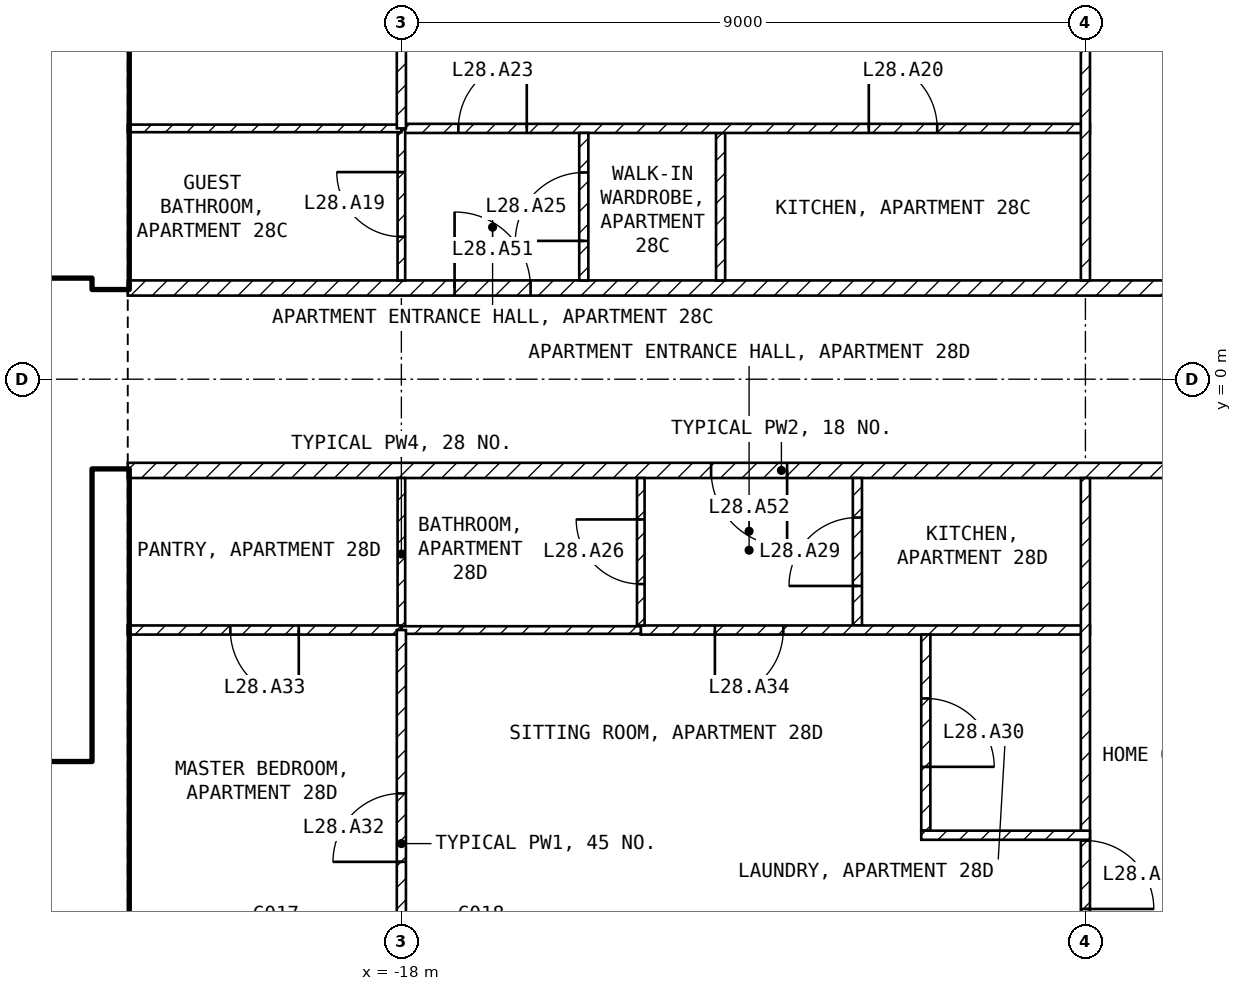
"""IFC4 building model, lengths in metres.
Left out: names, types, materials, properties, quantities, classifications, styles, units other than length and angle.
Written with IfcOpenShell. Run it as: python <this file> out.ifc"""

import sys

from ifc_helpers import new_model, si_unit, direction, frame, frame_2d, origin, place, context, subcontext, project, spatial, rectangle, extrude, element, fill, save


model = new_model("IFC4")
c1 = context("Model", 3, precision=1e-05, world=origin(), true_north=direction((0.0, 1.0)))
c2 = subcontext(c1, "Body", "Model", "MODEL_VIEW")
j1 = project(units=[si_unit("LENGTHUNIT", "METRE"), si_unit("PLANEANGLEUNIT", "RADIAN")], contexts=[c1])
p1 = place(None, origin())
s1 = spatial("IfcSite", under=j1, at=p1, CompositionType="ELEMENT")
p2 = place(p1, origin())
s2 = spatial("IfcBuilding", under=s1, at=p2, CompositionType="ELEMENT")
p3 = place(p2, frame((0.0, 0.0, 119.9)))
s3 = spatial("IfcBuildingStorey", under=s2, at=p3, CompositionType="ELEMENT", Elevation=119.9)
for number, where, z_axis, x_axis in (
    (1, (-21.825, -8.1, 0.0), (0.0, 0.0, 1.0), (0.0, 1.0, 0.0)),
    (2, (-21.825, 1.2, 0.0), (0.0, 0.0, 1.0), (0.0, 1.0, 0.0)),
):
    element("IfcWall", number, at=place(p3, frame(where, z_axis=z_axis, x_axis=x_axis)), inside=s3, PredefinedType="SHEAR", context=c2, shape_type="SweptSolid", body=[
        extrude(rectangle(XDim=6.9, YDim=0.45, at=frame_2d((3.45, 0.0))), origin(), (0.0, 0.0, 1.0), 3.25),
    ])
p4 = place(p3, frame((-33.05, 1.45, 0.0), z_axis=(0.0, 0.0, 1.0), x_axis=(1.0, 0.0, 0.0)))
e3 = element("IfcWall", 3, at=p4, inside=s3, PredefinedType="SOLIDWALL", context=c2, shape_type="SweptSolid", body=[
    extrude(rectangle(XDim=11.0, YDim=0.2, at=frame_2d((5.5, 0.0))), origin(), (0.0, 0.0, 1.0), 3.25),
])
p5 = place(p4, frame((9.25, 0.0, 0.0)))
e4 = element("IfcOpeningElement", 4, at=p5, cuts=e3, PredefinedType="OPENING", context=c2, shape_type="SweptSolid", body=[
    extrude(rectangle(XDim=1.0, YDim=2.1, at=frame_2d((0.5, 1.05))), frame((0.0, 0.11, 0.0), z_axis=(0.0, -1.0, 0.0), x_axis=(1.0, 0.0, 0.0)), (0.0, 0.0, 1.0), 0.22),
])
p6 = place(p4, frame((6.75, 0.0, 0.0)))
e5 = element("IfcOpeningElement", 5, at=p6, cuts=e3, PredefinedType="OPENING", context=c2, shape_type="SweptSolid", body=[
    extrude(rectangle(XDim=1.0, YDim=2.1, at=frame_2d((0.5, 1.05))), frame((0.0, 0.11, 0.0), z_axis=(0.0, -1.0, 0.0), x_axis=(1.0, 0.0, 0.0)), (0.0, 0.0, 1.0), 0.22),
])
p7 = place(p4, frame((1.025, 0.0, 0.0)))
e6 = element("IfcOpeningElement", 6, at=p7, cuts=e3, PredefinedType="OPENING", context=c2, shape_type="SweptSolid", body=[
    extrude(rectangle(XDim=0.9, YDim=2.1, at=frame_2d((0.45, 1.05))), frame((0.0, 0.11, 0.0), z_axis=(0.0, -1.0, 0.0), x_axis=(1.0, 0.0, 0.0)), (0.0, 0.0, 1.0), 0.22),
])
p8 = place(p3, frame((-28.35, -5.15, 0.0), z_axis=(0.0, 0.0, 1.0), x_axis=(1.0, 0.0, 0.0)))
e7 = element("IfcWall", 7, at=p8, inside=s3, PredefinedType="SOLIDWALL", context=c2, shape_type="SweptSolid", body=[
    extrude(rectangle(XDim=6.3, YDim=0.2, at=frame_2d((3.15, 0.0))), origin(), (0.0, 0.0, 1.0), 3.25),
])
p9 = place(p8, frame((5.1, 0.0, 0.0)))
e8 = element("IfcOpeningElement", 8, at=p9, cuts=e7, PredefinedType="OPENING", context=c2, shape_type="SweptSolid", body=[
    extrude(rectangle(XDim=1.0, YDim=2.1, at=frame_2d((0.5, 1.05))), frame((0.0, 0.11, 0.0), z_axis=(0.0, -1.0, 0.0), x_axis=(1.0, 0.0, 0.0)), (0.0, 0.0, 1.0), 0.22),
])
p10 = place(p3, frame((-21.6, 1.2, 0.0), z_axis=(0.0, 0.0, 1.0), x_axis=(1.0, 0.0, 0.0)))
e9 = element("IfcWall", 9, at=p10, inside=s3, PredefinedType="PARTITIONING", context=c2, shape_type="SweptSolid", body=[
    extrude(rectangle(XDim=17.2, YDim=0.2, at=frame_2d((8.6, 0.0))), origin(), (0.0, 0.0, 1.0), 3.25),
])
p11 = place(p10, frame((4.3, 0.0, 0.0)))
e10 = element("IfcOpeningElement", 10, at=p11, cuts=e9, PredefinedType="OPENING", context=c2, shape_type="SweptSolid", body=[
    extrude(rectangle(XDim=1.0, YDim=2.1, at=frame_2d((0.5, 1.05))), frame((0.0, 0.11, 0.0), z_axis=(0.0, -1.0, 0.0), x_axis=(1.0, 0.0, 0.0)), (0.0, 0.0, 1.0), 0.22),
])
p12 = place(p3, frame((-4.4, -1.2, 0.0), z_axis=(0.0, 0.0, 1.0), x_axis=(-1.0, 0.0, 0.0)))
e11 = element("IfcWall", 11, at=p12, inside=s3, PredefinedType="PARTITIONING", context=c2, shape_type="SweptSolid", body=[
    extrude(rectangle(XDim=17.2, YDim=0.2, at=frame_2d((8.6, 0.0))), origin(), (0.0, 0.0, 1.0), 3.25),
])
p13 = place(p12, frame((8.525, 0.0, 0.0)))
e12 = element("IfcOpeningElement", 12, at=p13, cuts=e11, PredefinedType="OPENING", context=c2, shape_type="SweptSolid", body=[
    extrude(rectangle(XDim=1.0, YDim=2.1, at=frame_2d((0.5, 1.05))), frame((0.0, 0.11, 0.0), z_axis=(0.0, -1.0, 0.0), x_axis=(1.0, 0.0, 0.0)), (0.0, 0.0, 1.0), 0.22),
])
p14 = place(p3, frame((-13.8, 1.3, 0.0), z_axis=(0.0, 0.0, 1.0), x_axis=(0.0, 1.0, 0.0)))
e13 = element("IfcWall", 13, at=p14, inside=s3, PredefinedType="PARTITIONING", context=c2, shape_type="SweptSolid", body=[
    extrude(rectangle(XDim=1.94, YDim=0.12, at=frame_2d((0.97, 0.0))), origin(), (0.0, 0.0, 1.0), 3.25),
])
p15 = place(p3, frame((-18.0, 3.3, 0.0), z_axis=(0.0, 0.0, 1.0), x_axis=(1.0, 0.0, 0.0)))
e14 = element("IfcWall", 14, at=p15, inside=s3, PredefinedType="PARTITIONING", context=c2, shape_type="SweptSolid", body=[
    extrude(rectangle(XDim=9.06, YDim=0.12, at=frame_2d((4.53, 0.0))), origin(), (0.0, 0.0, 1.0), 3.25),
])
p16 = place(p15, frame((6.15, 0.0, 0.0)))
e15 = element("IfcOpeningElement", 15, at=p16, cuts=e14, PredefinedType="OPENING", context=c2, shape_type="SweptSolid", body=[
    extrude(rectangle(XDim=0.9, YDim=2.1, at=frame_2d((0.45, 1.05))), frame((0.0, 0.07, 0.0), z_axis=(0.0, -1.0, 0.0), x_axis=(1.0, 0.0, 0.0)), (0.0, 0.0, 1.0), 0.14),
])
p17 = place(p15, frame((0.75, 0.0, 0.0)))
e16 = element("IfcOpeningElement", 16, at=p17, cuts=e14, PredefinedType="OPENING", context=c2, shape_type="SweptSolid", body=[
    extrude(rectangle(XDim=0.9, YDim=2.1, at=frame_2d((0.45, 1.05))), frame((0.0, 0.07, 0.0), z_axis=(0.0, -1.0, 0.0), x_axis=(1.0, 0.0, 0.0)), (0.0, 0.0, 1.0), 0.14),
])
p18 = place(p3, frame((-9.0, 8.92, 0.0), z_axis=(0.0, 0.0, 1.0), x_axis=(0.0, -1.0, 0.0)))
e17 = element("IfcWall", 17, at=p18, inside=s3, PredefinedType="PARTITIONING", context=c2, shape_type="SweptSolid", body=[
    extrude(rectangle(XDim=7.62, YDim=0.12, at=frame_2d((3.81, 0.0))), origin(), (0.0, 0.0, 1.0), 3.25),
])
p19 = place(p18, frame((2.52, 0.0, 0.0)))
e18 = element("IfcOpeningElement", 18, at=p19, cuts=e17, PredefinedType="OPENING", context=c2, shape_type="SweptSolid", body=[
    extrude(rectangle(XDim=0.9, YDim=2.1, at=frame_2d((0.45, 1.05))), frame((0.0, 0.07, 0.0), z_axis=(0.0, -1.0, 0.0), x_axis=(1.0, 0.0, 0.0)), (0.0, 0.0, 1.0), 0.14),
])
p20 = place(p3, frame((-15.6, 1.3, 0.0), z_axis=(0.0, 0.0, 1.0), x_axis=(0.0, 1.0, 0.0)))
e19 = element("IfcWall", 19, at=p20, inside=s3, PredefinedType="PARTITIONING", context=c2, shape_type="SweptSolid", body=[
    extrude(rectangle(XDim=1.94, YDim=0.12, at=frame_2d((0.97, 0.0))), origin(), (0.0, 0.0, 1.0), 3.25),
])
p21 = place(p20, frame((0.52, 0.0, 0.0)))
e20 = element("IfcOpeningElement", 20, at=p21, cuts=e19, PredefinedType="OPENING", context=c2, shape_type="SweptSolid", body=[
    extrude(rectangle(XDim=0.9, YDim=2.1, at=frame_2d((0.45, 1.05))), frame((0.0, 0.07, 0.0), z_axis=(0.0, -1.0, 0.0), x_axis=(1.0, 0.0, 0.0)), (0.0, 0.0, 1.0), 0.14),
])
p22 = place(p3, frame((-18.0, 1.3, 0.0), z_axis=(0.0, 0.0, 1.0), x_axis=(0.0, 1.0, 0.0)))
e21 = element("IfcWall", 21, at=p22, inside=s3, PredefinedType="PARTITIONING", context=c2, shape_type="SweptSolid", body=[
    extrude(rectangle(XDim=2.0, YDim=0.1, at=frame_2d((1.0, 0.0))), origin(), (0.0, 0.0, 1.0), 2.414),
])
p23 = place(p22, frame((0.575, 0.0, 0.0)))
e22 = element("IfcOpeningElement", 22, at=p23, cuts=e21, PredefinedType="OPENING", context=c2, shape_type="SweptSolid", body=[
    extrude(rectangle(XDim=0.85, YDim=2.1, at=frame_2d((0.425, 1.05))), frame((0.0, 0.06, 0.0), z_axis=(0.0, -1.0, 0.0), x_axis=(1.0, 0.0, 0.0)), (0.0, 0.0, 1.0), 0.12),
])
p24 = place(p3, frame((-21.6, 3.3, 0.0), z_axis=(0.0, 0.0, 1.0), x_axis=(1.0, 0.0, 0.0)))
e23 = element("IfcWall", 23, at=p24, inside=s3, PredefinedType="PARTITIONING", context=c2, shape_type="SweptSolid", body=[
    extrude(rectangle(XDim=3.6, YDim=0.1, at=frame_2d((1.8, 0.0))), origin(), (0.0, 0.0, 1.0), 3.25),
])
p25 = place(p3, frame((-18.0, 3.3, 0.0), z_axis=(0.0, 0.0, 1.0), x_axis=(0.0, 1.0, 0.0)))
e24 = element("IfcWall", 24, at=p25, inside=s3, PredefinedType="PARTITIONING", context=c2, shape_type="SweptSolid", body=[
    extrude(rectangle(XDim=5.62, YDim=0.12, at=frame_2d((2.81, 0.0))), origin(), (0.0, 0.0, 1.0), 2.414),
])
p26 = place(p25, frame((2.15, 0.0, 0.0)))
e25 = element("IfcOpeningElement", 25, at=p26, cuts=e24, PredefinedType="OPENING", context=c2, shape_type="SweptSolid", body=[
    extrude(rectangle(XDim=0.9, YDim=2.1, at=frame_2d((0.45, 1.05))), frame((0.0, 0.07, 0.0), z_axis=(0.0, -1.0, 0.0), x_axis=(1.0, 0.0, 0.0)), (0.0, 0.0, 1.0), 0.14),
])
p27 = place(p3, frame((-12.0, -3.24, 0.0), z_axis=(0.0, 0.0, 1.0), x_axis=(0.0, 1.0, 0.0)))
e26 = element("IfcWall", 26, at=p27, inside=s3, PredefinedType="PARTITIONING", context=c2, shape_type="SweptSolid", body=[
    extrude(rectangle(XDim=1.94, YDim=0.12, at=frame_2d((0.97, 0.0))), origin(), (0.0, 0.0, 1.0), 3.25),
])
p28 = place(p27, frame((0.52, 0.0, 0.0)))
e27 = element("IfcOpeningElement", 27, at=p28, cuts=e26, PredefinedType="OPENING", context=c2, shape_type="SweptSolid", body=[
    extrude(rectangle(XDim=0.9, YDim=2.1, at=frame_2d((0.45, 1.05))), frame((0.0, 0.07, 0.0), z_axis=(0.0, -1.0, 0.0), x_axis=(1.0, 0.0, 0.0)), (0.0, 0.0, 1.0), 0.14),
])
p29 = place(p3, frame((-8.94, -3.3, 0.0), z_axis=(0.0, 0.0, 1.0), x_axis=(-1.0, 0.0, 0.0)))
e28 = element("IfcWall", 28, at=p29, inside=s3, PredefinedType="PARTITIONING", context=c2, shape_type="SweptSolid", body=[
    extrude(rectangle(XDim=5.91, YDim=0.12, at=frame_2d((2.955, 0.0))), origin(), (0.0, 0.0, 1.0), 3.25),
])
p30 = place(p29, frame((4.035, 0.0, 0.0)))
e29 = element("IfcOpeningElement", 29, at=p30, cuts=e28, PredefinedType="OPENING", context=c2, shape_type="SweptSolid", body=[
    extrude(rectangle(XDim=0.9, YDim=2.1, at=frame_2d((0.45, 1.05))), frame((0.0, 0.07, 0.0), z_axis=(0.0, -1.0, 0.0), x_axis=(1.0, 0.0, 0.0)), (0.0, 0.0, 1.0), 0.14),
])
p31 = place(p3, frame((-9.0, -1.3, 0.0), z_axis=(0.0, 0.0, 1.0), x_axis=(0.0, -1.0, 0.0)))
e30 = element("IfcWall", 30, at=p31, inside=s3, PredefinedType="PARTITIONING", context=c2, shape_type="SweptSolid", body=[
    extrude(rectangle(XDim=7.62, YDim=0.12, at=frame_2d((3.81, 0.0))), origin(), (0.0, 0.0, 1.0), 3.25),
])
p32 = place(p31, frame((4.77, 0.0, 0.0)))
e31 = element("IfcOpeningElement", 31, at=p32, cuts=e30, PredefinedType="OPENING", context=c2, shape_type="SweptSolid", body=[
    extrude(rectangle(XDim=0.9, YDim=2.1, at=frame_2d((0.45, 1.05))), frame((0.0, 0.07, 0.0), z_axis=(0.0, -1.0, 0.0), x_axis=(1.0, 0.0, 0.0)), (0.0, 0.0, 1.0), 0.14),
])
p33 = place(p3, frame((-14.85, -3.24, 0.0), z_axis=(0.0, 0.0, 1.0), x_axis=(0.0, 1.0, 0.0)))
e32 = element("IfcWall", 32, at=p33, inside=s3, PredefinedType="PARTITIONING", context=c2, shape_type="SweptSolid", body=[
    extrude(rectangle(XDim=1.94, YDim=0.1, at=frame_2d((0.97, 0.0))), origin(), (0.0, 0.0, 1.0), 3.25),
])
p34 = place(p33, frame((0.545, 0.0, 0.0)))
e33 = element("IfcOpeningElement", 33, at=p34, cuts=e32, PredefinedType="OPENING", context=c2, shape_type="SweptSolid", body=[
    extrude(rectangle(XDim=0.85, YDim=2.1, at=frame_2d((0.425, 1.05))), frame((0.0, 0.06, 0.0), z_axis=(0.0, -1.0, 0.0), x_axis=(1.0, 0.0, 0.0)), (0.0, 0.0, 1.0), 0.12),
])
p35 = place(p3, frame((-18.0, -3.3, 0.0), z_axis=(0.0, 0.0, 1.0), x_axis=(0.0, 1.0, 0.0)))
e34 = element("IfcWall", 34, at=p35, inside=s3, PredefinedType="PARTITIONING", context=c2, shape_type="SweptSolid", body=[
    extrude(rectangle(XDim=2.0, YDim=0.1, at=frame_2d((1.0, 0.0))), origin(), (0.0, 0.0, 1.0), 2.414),
])
p36 = place(p3, frame((-14.85, -3.3, 0.0), z_axis=(0.0, 0.0, 1.0), x_axis=(-1.0, 0.0, 0.0)))
e35 = element("IfcWall", 35, at=p36, inside=s3, PredefinedType="PARTITIONING", context=c2, shape_type="SweptSolid", body=[
    extrude(rectangle(XDim=3.15, YDim=0.1, at=frame_2d((1.575, 0.0))), origin(), (0.0, 0.0, 1.0), 3.25),
])
p37 = place(p3, frame((-18.0, -3.3, 0.0), z_axis=(0.0, 0.0, 1.0), x_axis=(-1.0, 0.0, 0.0)))
e36 = element("IfcWall", 36, at=p37, inside=s3, PredefinedType="PARTITIONING", context=c2, shape_type="SweptSolid", body=[
    extrude(rectangle(XDim=3.6, YDim=0.12, at=frame_2d((1.8, 0.0))), origin(), (0.0, 0.0, 1.0), 3.25),
])
p38 = place(p37, frame((1.35, 0.0, 0.0)))
e37 = element("IfcOpeningElement", 37, at=p38, cuts=e36, PredefinedType="OPENING", context=c2, shape_type="SweptSolid", body=[
    extrude(rectangle(XDim=0.9, YDim=2.1, at=frame_2d((0.45, 1.05))), frame((0.0, 0.07, 0.0), z_axis=(0.0, -1.0, 0.0), x_axis=(1.0, 0.0, 0.0)), (0.0, 0.0, 1.0), 0.14),
])
p39 = place(p3, frame((-11.1, -3.36, 0.0), z_axis=(0.0, 0.0, 1.0), x_axis=(0.0, -1.0, 0.0)))
e38 = element("IfcWall", 38, at=p39, inside=s3, PredefinedType="PARTITIONING", context=c2, shape_type="SweptSolid", body=[
    extrude(rectangle(XDim=2.58, YDim=0.12, at=frame_2d((1.29, 0.0))), origin(), (0.0, 0.0, 1.0), 3.25),
])
p40 = place(p39, frame((0.84, 0.0, 0.0)))
e39 = element("IfcOpeningElement", 39, at=p40, cuts=e38, PredefinedType="OPENING", context=c2, shape_type="SweptSolid", body=[
    extrude(rectangle(XDim=0.9, YDim=2.1, at=frame_2d((0.45, 1.05))), frame((0.0, 0.07, 0.0), z_axis=(0.0, -1.0, 0.0), x_axis=(1.0, 0.0, 0.0)), (0.0, 0.0, 1.0), 0.14),
])
p41 = place(p3, frame((-11.16, -6.0, 0.0), z_axis=(0.0, 0.0, 1.0), x_axis=(1.0, 0.0, 0.0)))
e40 = element("IfcWall", 40, at=p41, inside=s3, PredefinedType="PARTITIONING", context=c2, shape_type="SweptSolid", body=[
    extrude(rectangle(XDim=2.22, YDim=0.12, at=frame_2d((1.11, 0.0))), origin(), (0.0, 0.0, 1.0), 3.25),
])
p42 = place(p3, frame((-18.0, -8.92, 0.0), z_axis=(0.0, 0.0, 1.0), x_axis=(0.0, 1.0, 0.0)))
e41 = element("IfcWall", 41, at=p42, inside=s3, PredefinedType="PARTITIONING", context=c2, shape_type="SweptSolid", body=[
    extrude(rectangle(XDim=5.62, YDim=0.12, at=frame_2d((2.81, 0.0))), origin(), (0.0, 0.0, 1.0), 2.414),
])
p43 = place(p42, frame((2.57, 0.0, 0.0)))
e42 = element("IfcOpeningElement", 42, at=p43, cuts=e41, PredefinedType="OPENING", context=c2, shape_type="SweptSolid", body=[
    extrude(rectangle(XDim=0.9, YDim=2.1, at=frame_2d((0.45, 1.05))), frame((0.0, 0.07, 0.0), z_axis=(0.0, -1.0, 0.0), x_axis=(1.0, 0.0, 0.0)), (0.0, 0.0, 1.0), 0.14),
])
p44 = place(p9, origin())
e43 = element("IfcDoor", 43, at=p44, inside=s3, OperationType="SINGLE_SWING_LEFT", PredefinedType="DOOR", context=c2, shape_type="SweptSolid", body=[
    extrude(rectangle(XDim=1.0, YDim=2.1, at=frame_2d((0.5, 1.05))), frame((0.0, 0.025, 0.0), z_axis=(0.0, -1.0, 0.0), x_axis=(1.0, 0.0, 0.0)), (0.0, 0.0, 1.0), 0.05),
])
fill(e8, e43)
p45 = place(p23, origin())
e44 = element("IfcDoor", 44, at=p45, inside=s3, OperationType="SINGLE_SWING_RIGHT", PredefinedType="DOOR", context=c2, shape_type="SweptSolid", body=[
    extrude(rectangle(XDim=0.85, YDim=2.1, at=frame_2d((0.425, 1.05))), frame((0.0, 0.025, 0.0), z_axis=(0.0, -1.0, 0.0), x_axis=(1.0, 0.0, 0.0)), (0.0, 0.0, 1.0), 0.05),
])
fill(e22, e44)
p46 = place(p16, origin())
e45 = element("IfcDoor", 45, at=p46, inside=s3, OperationType="SINGLE_SWING_LEFT", PredefinedType="DOOR", context=c2, shape_type="SweptSolid", body=[
    extrude(rectangle(XDim=0.9, YDim=2.1, at=frame_2d((0.45, 1.05))), frame((0.0, 0.025, 0.0), z_axis=(0.0, -1.0, 0.0), x_axis=(1.0, 0.0, 0.0)), (0.0, 0.0, 1.0), 0.05),
])
fill(e15, e45)
p47 = place(p17, origin())
e46 = element("IfcDoor", 46, at=p47, inside=s3, OperationType="SINGLE_SWING_RIGHT", PredefinedType="DOOR", context=c2, shape_type="SweptSolid", body=[
    extrude(rectangle(XDim=0.9, YDim=2.1, at=frame_2d((0.45, 1.05))), frame((0.0, 0.025, 0.0), z_axis=(0.0, -1.0, 0.0), x_axis=(1.0, 0.0, 0.0)), (0.0, 0.0, 1.0), 0.05),
])
fill(e16, e46)
p48 = place(p21, origin())
e47 = element("IfcDoor", 47, at=p48, inside=s3, OperationType="SINGLE_SWING_LEFT", PredefinedType="DOOR", context=c2, shape_type="SweptSolid", body=[
    extrude(rectangle(XDim=0.9, YDim=2.1, at=frame_2d((0.45, 1.05))), frame((0.0, 0.025, 0.0), z_axis=(0.0, -1.0, 0.0), x_axis=(1.0, 0.0, 0.0)), (0.0, 0.0, 1.0), 0.05),
])
fill(e20, e47)
p49 = place(p34, origin())
e48 = element("IfcDoor", 48, at=p49, inside=s3, OperationType="SINGLE_SWING_RIGHT", PredefinedType="DOOR", context=c2, shape_type="SweptSolid", body=[
    extrude(rectangle(XDim=0.85, YDim=2.1, at=frame_2d((0.425, 1.05))), frame((0.0, 0.025, 0.0), z_axis=(0.0, -1.0, 0.0), x_axis=(1.0, 0.0, 0.0)), (0.0, 0.0, 1.0), 0.05),
])
fill(e33, e48)
p50 = place(p32, origin())
e49 = element("IfcDoor", 49, at=p50, inside=s3, OperationType="SINGLE_SWING_RIGHT", PredefinedType="DOOR", context=c2, shape_type="SweptSolid", body=[
    extrude(rectangle(XDim=0.9, YDim=2.1, at=frame_2d((0.45, 1.05))), frame((0.0, 0.025, 0.0), z_axis=(0.0, -1.0, 0.0), x_axis=(1.0, 0.0, 0.0)), (0.0, 0.0, 1.0), 0.05),
])
fill(e31, e49)
p51 = place(p28, origin())
e50 = element("IfcDoor", 50, at=p51, inside=s3, OperationType="SINGLE_SWING_LEFT", PredefinedType="DOOR", context=c2, shape_type="SweptSolid", body=[
    extrude(rectangle(XDim=0.9, YDim=2.1, at=frame_2d((0.45, 1.05))), frame((0.0, 0.025, 0.0), z_axis=(0.0, -1.0, 0.0), x_axis=(1.0, 0.0, 0.0)), (0.0, 0.0, 1.0), 0.05),
])
fill(e27, e50)
p52 = place(p40, origin())
e51 = element("IfcDoor", 51, at=p52, inside=s3, OperationType="SINGLE_SWING_RIGHT", PredefinedType="DOOR", context=c2, shape_type="SweptSolid", body=[
    extrude(rectangle(XDim=0.9, YDim=2.1, at=frame_2d((0.45, 1.05))), frame((0.0, 0.025, 0.0), z_axis=(0.0, -1.0, 0.0), x_axis=(1.0, 0.0, 0.0)), (0.0, 0.0, 1.0), 0.05),
])
fill(e39, e51)
p53 = place(p43, origin())
e52 = element("IfcDoor", 52, at=p53, inside=s3, OperationType="SINGLE_SWING_LEFT", PredefinedType="DOOR", context=c2, shape_type="SweptSolid", body=[
    extrude(rectangle(XDim=0.9, YDim=2.1, at=frame_2d((0.45, 1.05))), frame((0.0, 0.025, 0.0), z_axis=(0.0, -1.0, 0.0), x_axis=(1.0, 0.0, 0.0)), (0.0, 0.0, 1.0), 0.05),
])
fill(e42, e52)
p54 = place(p38, origin())
e53 = element("IfcDoor", 53, at=p54, inside=s3, OperationType="SINGLE_SWING_LEFT", PredefinedType="DOOR", context=c2, shape_type="SweptSolid", body=[
    extrude(rectangle(XDim=0.9, YDim=2.1, at=frame_2d((0.45, 1.05))), frame((0.0, 0.025, 0.0), z_axis=(0.0, -1.0, 0.0), x_axis=(1.0, 0.0, 0.0)), (0.0, 0.0, 1.0), 0.05),
])
fill(e37, e53)
p55 = place(p30, origin())
e54 = element("IfcDoor", 54, at=p55, inside=s3, OperationType="SINGLE_SWING_RIGHT", PredefinedType="DOOR", context=c2, shape_type="SweptSolid", body=[
    extrude(rectangle(XDim=0.9, YDim=2.1, at=frame_2d((0.45, 1.05))), frame((0.0, 0.025, 0.0), z_axis=(0.0, -1.0, 0.0), x_axis=(1.0, 0.0, 0.0)), (0.0, 0.0, 1.0), 0.05),
])
fill(e29, e54)
p56 = place(p11, origin())
e55 = element("IfcDoor", 55, at=p56, inside=s3, OperationType="SINGLE_SWING_LEFT", PredefinedType="DOOR", context=c2, shape_type="SweptSolid", body=[
    extrude(rectangle(XDim=1.0, YDim=2.1, at=frame_2d((0.5, 1.05))), frame((0.0, 0.025, 0.0), z_axis=(0.0, -1.0, 0.0), x_axis=(1.0, 0.0, 0.0)), (0.0, 0.0, 1.0), 0.05),
])
fill(e10, e55)
p57 = place(p13, origin())
e56 = element("IfcDoor", 56, at=p57, inside=s3, OperationType="SINGLE_SWING_LEFT", PredefinedType="DOOR", context=c2, shape_type="SweptSolid", body=[
    extrude(rectangle(XDim=1.0, YDim=2.1, at=frame_2d((0.5, 1.05))), frame((0.0, 0.025, 0.0), z_axis=(0.0, -1.0, 0.0), x_axis=(1.0, 0.0, 0.0)), (0.0, 0.0, 1.0), 0.05),
])
fill(e12, e56)
save(model, sys.argv[1])
